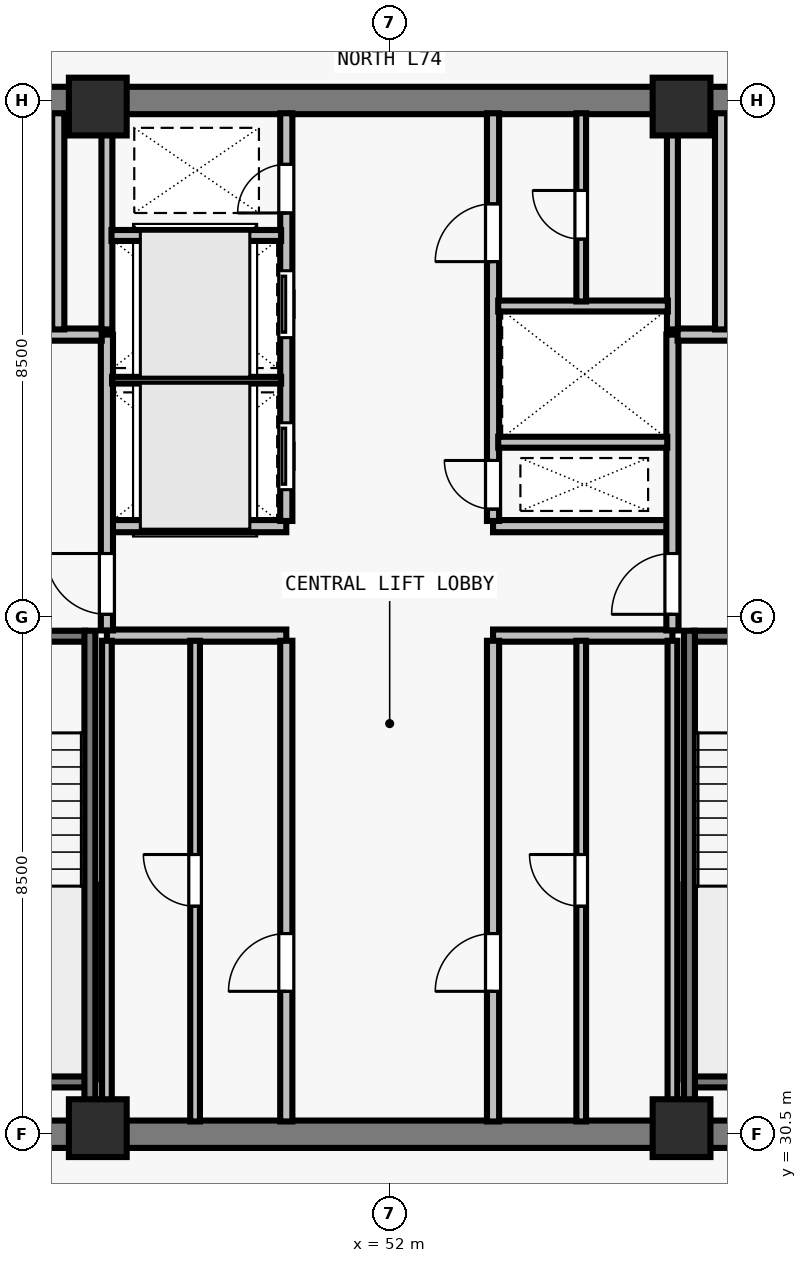
"""IFC4 building model, lengths in metres.
Left out: names, types, materials, properties, quantities, classifications, styles, units other than length and angle.
Written with IfcOpenShell. Run it as: python <this file> out.ifc"""

import sys

from ifc_helpers import new_model, si_unit, direction, frame, frame_2d, origin, origin_2d, place, context, subcontext, project, spatial, rectangle, extrude, element, fill, save


model = new_model("IFC4")
c1 = context("Model", 3, precision=1e-05, world=origin(), true_north=direction((0.0, 1.0)))
c2 = subcontext(c1, "Body", "Model", "MODEL_VIEW")
j1 = project(units=[si_unit("LENGTHUNIT", "METRE"), si_unit("PLANEANGLEUNIT", "RADIAN")], contexts=[c1])
p1 = place(None, origin())
s1 = spatial("IfcSite", under=j1, at=p1, CompositionType="ELEMENT")
p2 = place(p1, origin())
s2 = spatial("IfcBuilding", under=s1, at=p2, CompositionType="ELEMENT")
p3 = place(p2, frame((0.0, 0.0, 269.0)))
s3 = spatial("IfcBuildingStorey", under=s2, at=p3, CompositionType="ELEMENT", Elevation=269.0)
for number, where, z_axis, x_axis in (
    (1, (47.2, 30.6, 0.0), (0.0, 0.0, 1.0), (1.0, 0.0, 0.0)),
    (2, (56.8, 30.6, 0.0), (0.0, 0.0, 1.0), (1.0, 0.0, 0.0)),
    (3, (47.2, 47.4, 0.0), (0.0, 0.0, 1.0), (1.0, 0.0, 0.0)),
    (4, (56.8, 47.4, 0.0), (0.0, 0.0, 1.0), (1.0, 0.0, 0.0)),
):
    element("IfcColumn", number, at=place(p3, frame(where, z_axis=z_axis, x_axis=x_axis)), inside=s3, PredefinedType="COLUMN", context=c2, shape_type="SweptSolid", body=[
        extrude(rectangle(XDim=0.95, YDim=0.95, at=origin_2d()), origin(), (0.0, 0.0, 1.0), 3.5),
    ])
for number, where, z_axis, x_axis in (
    (5, (43.275, 30.5, 0.0), (0.0, 0.0, 1.0), (1.0, 0.0, 0.0)),
    (6, (43.275, 47.5, 0.0), (0.0, 0.0, 1.0), (1.0, 0.0, 0.0)),
):
    element("IfcWall", number, at=place(p3, frame(where, z_axis=z_axis, x_axis=x_axis)), inside=s3, PredefinedType="SHEAR", context=c2, shape_type="SweptSolid", body=[
        extrude(rectangle(XDim=17.45, YDim=0.45, at=frame_2d((8.725, 0.0))), origin(), (0.0, 0.0, 1.0), 3.29),
    ])
for number, where, z_axis, x_axis in (
    (7, (47.35, 38.7, 0.0), (0.0, 0.0, 1.0), (1.0, 0.0, 0.0)),
    (8, (47.35, 40.5, 0.0), (0.0, 0.0, 1.0), (1.0, 0.0, 0.0)),
    (9, (53.7, 38.7, 0.0), (0.0, 0.0, 1.0), (1.0, 0.0, 0.0)),
    (10, (53.7, 40.5, 0.0), (0.0, 0.0, 1.0), (1.0, 0.0, 0.0)),
):
    element("IfcWall", number, at=place(p3, frame(where, z_axis=z_axis, x_axis=x_axis)), inside=s3, PredefinedType="SOLIDWALL", context=c2, shape_type="SweptSolid", body=[
        extrude(rectangle(XDim=2.95, YDim=0.2, at=frame_2d((1.475, 0.0))), origin(), (0.0, 0.0, 1.0), 3.29),
    ])
p4 = place(p3, frame((50.3, 30.71, 0.0), z_axis=(0.0, 0.0, 1.0), x_axis=(0.0, 1.0, 0.0)))
e11 = element("IfcWall", 11, at=p4, inside=s3, PredefinedType="SOLIDWALL", context=c2, shape_type="SweptSolid", body=[
    extrude(rectangle(XDim=7.905, YDim=0.2, at=frame_2d((3.953, 0.0))), origin(), (0.0, 0.0, 1.0), 3.29),
])
p5 = place(p4, frame((2.14, 0.0, 0.0)))
e12 = element("IfcOpeningElement", 12, at=p5, cuts=e11, PredefinedType="OPENING", context=c2, shape_type="SweptSolid", body=[
    extrude(rectangle(XDim=0.95, YDim=2.12, at=frame_2d((0.475, 1.06))), frame((0.0, 0.11, 0.0), z_axis=(0.0, -1.0, 0.0), x_axis=(1.0, 0.0, 0.0)), (0.0, 0.0, 1.0), 0.22),
])
p6 = place(p3, frame((53.7, 30.71, 0.0), z_axis=(0.0, 0.0, 1.0), x_axis=(0.0, 1.0, 0.0)))
e13 = element("IfcWall", 13, at=p6, inside=s3, PredefinedType="SOLIDWALL", context=c2, shape_type="SweptSolid", body=[
    extrude(rectangle(XDim=7.905, YDim=0.2, at=frame_2d((3.953, 0.0))), origin(), (0.0, 0.0, 1.0), 3.29),
])
p7 = place(p6, frame((2.14, 0.0, 0.0)))
e14 = element("IfcOpeningElement", 14, at=p7, cuts=e13, PredefinedType="OPENING", context=c2, shape_type="SweptSolid", body=[
    extrude(rectangle(XDim=0.95, YDim=2.12, at=frame_2d((0.475, 1.06))), frame((0.0, 0.11, 0.0), z_axis=(0.0, -1.0, 0.0), x_axis=(1.0, 0.0, 0.0)), (0.0, 0.0, 1.0), 0.22),
])
p8 = place(p3, frame((50.3, 40.585, 0.0), z_axis=(0.0, 0.0, 1.0), x_axis=(0.0, 1.0, 0.0)))
e15 = element("IfcWall", 15, at=p8, inside=s3, PredefinedType="SOLIDWALL", context=c2, shape_type="SweptSolid", body=[
    extrude(rectangle(XDim=6.705, YDim=0.2, at=frame_2d((3.353, 0.0))), origin(), (0.0, 0.0, 1.0), 3.29),
])
p9 = place(p8, frame((0.515, 0.0, 0.0)))
e16 = element("IfcOpeningElement", 16, at=p9, cuts=e15, PredefinedType="OPENING", context=c2, shape_type="SweptSolid", body=[
    extrude(rectangle(XDim=1.1, YDim=2.2, at=frame_2d((0.55, 1.1))), frame((0.0, 0.11, 0.0), z_axis=(0.0, -1.0, 0.0), x_axis=(1.0, 0.0, 0.0)), (0.0, 0.0, 1.0), 0.22),
])
p10 = place(p8, frame((3.015, 0.0, 0.0)))
e17 = element("IfcOpeningElement", 17, at=p10, cuts=e15, PredefinedType="OPENING", context=c2, shape_type="SweptSolid", body=[
    extrude(rectangle(XDim=1.1, YDim=2.2, at=frame_2d((0.55, 1.1))), frame((0.0, 0.11, 0.0), z_axis=(0.0, -1.0, 0.0), x_axis=(1.0, 0.0, 0.0)), (0.0, 0.0, 1.0), 0.22),
])
p11 = place(p8, frame((5.065, 0.0, 0.0)))
e18 = element("IfcOpeningElement", 18, at=p11, cuts=e15, PredefinedType="OPENING", context=c2, shape_type="SweptSolid", body=[
    extrude(rectangle(XDim=0.8, YDim=2.08, at=frame_2d((0.4, 1.04))), frame((0.0, 0.11, 0.0), z_axis=(0.0, -1.0, 0.0), x_axis=(1.0, 0.0, 0.0)), (0.0, 0.0, 1.0), 0.22),
])
p12 = place(p3, frame((53.7, 40.585, 0.0), z_axis=(0.0, 0.0, 1.0), x_axis=(0.0, 1.0, 0.0)))
e19 = element("IfcWall", 19, at=p12, inside=s3, PredefinedType="SOLIDWALL", context=c2, shape_type="SweptSolid", body=[
    extrude(rectangle(XDim=6.705, YDim=0.2, at=frame_2d((3.353, 0.0))), origin(), (0.0, 0.0, 1.0), 3.29),
])
p13 = place(p12, frame((0.195, 0.0, 0.0)))
e20 = element("IfcOpeningElement", 20, at=p13, cuts=e19, PredefinedType="OPENING", context=c2, shape_type="SweptSolid", body=[
    extrude(rectangle(XDim=0.8, YDim=2.08, at=frame_2d((0.4, 1.04))), frame((0.0, 0.11, 0.0), z_axis=(0.0, -1.0, 0.0), x_axis=(1.0, 0.0, 0.0)), (0.0, 0.0, 1.0), 0.22),
])
p14 = place(p12, frame((4.265, 0.0, 0.0)))
e21 = element("IfcOpeningElement", 21, at=p14, cuts=e19, PredefinedType="OPENING", context=c2, shape_type="SweptSolid", body=[
    extrude(rectangle(XDim=0.95, YDim=2.12, at=frame_2d((0.475, 1.06))), frame((0.0, 0.11, 0.0), z_axis=(0.0, -1.0, 0.0), x_axis=(1.0, 0.0, 0.0)), (0.0, 0.0, 1.0), 0.22),
])
p15 = place(p3, frame((47.35, 38.785, 0.0), z_axis=(0.0, 0.0, 1.0), x_axis=(0.0, 1.0, 0.0)))
e22 = element("IfcWall", 22, at=p15, inside=s3, PredefinedType="SOLIDWALL", context=c2, shape_type="SweptSolid", body=[
    extrude(rectangle(XDim=4.865, YDim=0.2, at=frame_2d((2.433, 0.0))), origin(), (0.0, 0.0, 1.0), 3.29),
])
p16 = place(p15, frame((0.265, 0.0, 0.0)))
e23 = element("IfcOpeningElement", 23, at=p16, cuts=e22, PredefinedType="OPENING", context=c2, shape_type="SweptSolid", body=[
    extrude(rectangle(XDim=1.0, YDim=2.15, at=frame_2d((0.5, 1.075))), frame((0.0, 0.11, 0.0), z_axis=(0.0, -1.0, 0.0), x_axis=(1.0, 0.0, 0.0)), (0.0, 0.0, 1.0), 0.22),
])
p17 = place(p3, frame((43.71, 43.65, 0.0), z_axis=(0.0, 0.0, 1.0), x_axis=(1.0, 0.0, 0.0)))
e24 = element("IfcWall", 24, at=p17, inside=s3, PredefinedType="SOLIDWALL", context=c2, shape_type="SweptSolid", body=[
    extrude(rectangle(XDim=3.555, YDim=0.2, at=frame_2d((1.777, 0.0))), origin(), (0.0, 0.0, 1.0), 3.29),
])
p18 = place(p17, frame((1.16, 0.0, 0.0)))
e25 = element("IfcOpeningElement", 25, at=p18, cuts=e24, PredefinedType="OPENING", context=c2, shape_type="SweptSolid", body=[
    extrude(rectangle(XDim=1.1, YDim=2.2, at=frame_2d((0.55, 1.1))), frame((0.0, 0.11, 0.0), z_axis=(0.0, -1.0, 0.0), x_axis=(1.0, 0.0, 0.0)), (0.0, 0.0, 1.0), 0.22),
])
p19 = place(p3, frame((46.55, 43.735, 0.0), z_axis=(0.0, 0.0, 1.0), x_axis=(0.0, 1.0, 0.0)))
e26 = element("IfcWall", 26, at=p19, inside=s3, PredefinedType="SOLIDWALL", context=c2, shape_type="SweptSolid", body=[
    extrude(rectangle(XDim=3.555, YDim=0.2, at=frame_2d((1.777, 0.0))), origin(), (0.0, 0.0, 1.0), 3.29),
])
p20 = place(p3, frame((56.65, 38.785, 0.0), z_axis=(0.0, 0.0, 1.0), x_axis=(0.0, 1.0, 0.0)))
e27 = element("IfcWall", 27, at=p20, inside=s3, PredefinedType="SOLIDWALL", context=c2, shape_type="SweptSolid", body=[
    extrude(rectangle(XDim=4.865, YDim=0.2, at=frame_2d((2.433, 0.0))), origin(), (0.0, 0.0, 1.0), 3.29),
])
p21 = place(p20, frame((0.265, 0.0, 0.0)))
e28 = element("IfcOpeningElement", 28, at=p21, cuts=e27, PredefinedType="OPENING", context=c2, shape_type="SweptSolid", body=[
    extrude(rectangle(XDim=1.0, YDim=2.15, at=frame_2d((0.5, 1.075))), frame((0.0, 0.11, 0.0), z_axis=(0.0, -1.0, 0.0), x_axis=(1.0, 0.0, 0.0)), (0.0, 0.0, 1.0), 0.22),
])
p22 = place(p3, frame((56.735, 43.65, 0.0), z_axis=(0.0, 0.0, 1.0), x_axis=(1.0, 0.0, 0.0)))
e29 = element("IfcWall", 29, at=p22, inside=s3, PredefinedType="SOLIDWALL", context=c2, shape_type="SweptSolid", body=[
    extrude(rectangle(XDim=3.555, YDim=0.2, at=frame_2d((1.777, 0.0))), origin(), (0.0, 0.0, 1.0), 3.29),
])
p23 = place(p22, frame((1.295, 0.0, 0.0)))
e30 = element("IfcOpeningElement", 30, at=p23, cuts=e29, PredefinedType="OPENING", context=c2, shape_type="SweptSolid", body=[
    extrude(rectangle(XDim=1.1, YDim=2.2, at=frame_2d((0.55, 1.1))), frame((0.0, 0.11, 0.0), z_axis=(0.0, -1.0, 0.0), x_axis=(1.0, 0.0, 0.0)), (0.0, 0.0, 1.0), 0.22),
])
p24 = place(p3, frame((57.45, 43.735, 0.0), z_axis=(0.0, 0.0, 1.0), x_axis=(0.0, 1.0, 0.0)))
e31 = element("IfcWall", 31, at=p24, inside=s3, PredefinedType="SOLIDWALL", context=c2, shape_type="SweptSolid", body=[
    extrude(rectangle(XDim=3.555, YDim=0.2, at=frame_2d((1.777, 0.0))), origin(), (0.0, 0.0, 1.0), 3.29),
])
p25 = place(p3, frame((47.35, 30.71, 0.0), z_axis=(0.0, 0.0, 1.0), x_axis=(0.0, 1.0, 0.0)))
e32 = element("IfcWall", 32, at=p25, inside=s3, PredefinedType="PARTITIONING", context=c2, shape_type="SweptSolid", body=[
    extrude(rectangle(XDim=7.905, YDim=0.16, at=frame_2d((3.953, 0.0))), origin(), (0.0, 0.0, 1.0), 3.29),
])
p26 = place(p3, frame((48.8, 30.71, 0.0), z_axis=(0.0, 0.0, 1.0), x_axis=(0.0, 1.0, 0.0)))
e33 = element("IfcWall", 33, at=p26, inside=s3, PredefinedType="PARTITIONING", context=c2, shape_type="SweptSolid", body=[
    extrude(rectangle(XDim=7.905, YDim=0.16, at=frame_2d((3.953, 0.0))), origin(), (0.0, 0.0, 1.0), 3.29),
])
p27 = place(p26, frame((3.54, 0.0, 0.0)))
e34 = element("IfcOpeningElement", 34, at=p27, cuts=e33, PredefinedType="OPENING", context=c2, shape_type="SweptSolid", body=[
    extrude(rectangle(XDim=0.85, YDim=2.12, at=frame_2d((0.425, 1.06))), frame((0.0, 0.09, 0.0), z_axis=(0.0, -1.0, 0.0), x_axis=(1.0, 0.0, 0.0)), (0.0, 0.0, 1.0), 0.18),
])
p28 = place(p3, frame((56.65, 30.71, 0.0), z_axis=(0.0, 0.0, 1.0), x_axis=(0.0, 1.0, 0.0)))
e35 = element("IfcWall", 35, at=p28, inside=s3, PredefinedType="PARTITIONING", context=c2, shape_type="SweptSolid", body=[
    extrude(rectangle(XDim=7.905, YDim=0.16, at=frame_2d((3.953, 0.0))), origin(), (0.0, 0.0, 1.0), 3.29),
])
p29 = place(p3, frame((55.15, 30.71, 0.0), z_axis=(0.0, 0.0, 1.0), x_axis=(0.0, 1.0, 0.0)))
e36 = element("IfcWall", 36, at=p29, inside=s3, PredefinedType="PARTITIONING", context=c2, shape_type="SweptSolid", body=[
    extrude(rectangle(XDim=7.905, YDim=0.16, at=frame_2d((3.953, 0.0))), origin(), (0.0, 0.0, 1.0), 3.29),
])
p30 = place(p29, frame((3.54, 0.0, 0.0)))
e37 = element("IfcOpeningElement", 37, at=p30, cuts=e36, PredefinedType="OPENING", context=c2, shape_type="SweptSolid", body=[
    extrude(rectangle(XDim=0.85, YDim=2.12, at=frame_2d((0.425, 1.06))), frame((0.0, 0.09, 0.0), z_axis=(0.0, -1.0, 0.0), x_axis=(1.0, 0.0, 0.0)), (0.0, 0.0, 1.0), 0.18),
])
p31 = place(p3, frame((47.35, 43.735, 0.0), z_axis=(0.0, 0.0, 1.0), x_axis=(0.0, 1.0, 0.0)))
e38 = element("IfcWall", 38, at=p31, inside=s3, PredefinedType="SOLIDWALL", context=c2, shape_type="SweptSolid", body=[
    extrude(rectangle(XDim=3.555, YDim=0.18, at=frame_2d((1.777, 0.0))), origin(), (0.0, 0.0, 1.0), 3.29),
])
p32 = place(p3, frame((47.435, 42.9, 0.0), z_axis=(0.0, 0.0, 1.0), x_axis=(1.0, 0.0, 0.0)))
e39 = element("IfcWall", 39, at=p32, inside=s3, PredefinedType="PARTITIONING", context=c2, shape_type="SweptSolid", body=[
    extrude(rectangle(XDim=2.78, YDim=0.11, at=frame_2d((1.39, 0.0))), origin(), (0.0, 0.0, 1.0), 3.29),
])
p33 = place(p3, frame((47.425, 45.28, 0.0), z_axis=(0.0, 0.0, 1.0), x_axis=(1.0, 0.0, 0.0)))
e40 = element("IfcWall", 40, at=p33, inside=s3, PredefinedType="SOLIDWALL", context=c2, shape_type="SweptSolid", body=[
    extrude(rectangle(XDim=2.79, YDim=0.18, at=frame_2d((1.395, 0.0))), origin(), (0.0, 0.0, 1.0), 3.29),
])
p34 = place(p3, frame((56.65, 43.735, 0.0), z_axis=(0.0, 0.0, 1.0), x_axis=(0.0, 1.0, 0.0)))
e41 = element("IfcWall", 41, at=p34, inside=s3, PredefinedType="SOLIDWALL", context=c2, shape_type="SweptSolid", body=[
    extrude(rectangle(XDim=3.555, YDim=0.18, at=frame_2d((1.777, 0.0))), origin(), (0.0, 0.0, 1.0), 3.29),
])
p35 = place(p3, frame((53.785, 41.88, 0.0), z_axis=(0.0, 0.0, 1.0), x_axis=(1.0, 0.0, 0.0)))
e42 = element("IfcWall", 42, at=p35, inside=s3, PredefinedType="SOLIDWALL", context=c2, shape_type="SweptSolid", body=[
    extrude(rectangle(XDim=2.78, YDim=0.18, at=frame_2d((1.39, 0.0))), origin(), (0.0, 0.0, 1.0), 3.29),
])
p36 = place(p3, frame((53.785, 44.12, 0.0), z_axis=(0.0, 0.0, 1.0), x_axis=(1.0, 0.0, 0.0)))
e43 = element("IfcWall", 43, at=p36, inside=s3, PredefinedType="SOLIDWALL", context=c2, shape_type="SweptSolid", body=[
    extrude(rectangle(XDim=2.79, YDim=0.18, at=frame_2d((1.395, 0.0))), origin(), (0.0, 0.0, 1.0), 3.29),
])
p37 = place(p3, frame((55.15, 44.195, 0.0), z_axis=(0.0, 0.0, 1.0), x_axis=(0.0, 1.0, 0.0)))
e44 = element("IfcWall", 44, at=p37, inside=s3, PredefinedType="PARTITIONING", context=c2, shape_type="SweptSolid", body=[
    extrude(rectangle(XDim=3.095, YDim=0.16, at=frame_2d((1.547, 0.0))), origin(), (0.0, 0.0, 1.0), 3.29),
])
p38 = place(p37, frame((1.025, 0.0, 0.0)))
e45 = element("IfcOpeningElement", 45, at=p38, cuts=e44, PredefinedType="OPENING", context=c2, shape_type="SweptSolid", body=[
    extrude(rectangle(XDim=0.8, YDim=2.1, at=frame_2d((0.4, 1.05))), frame((0.0, 0.09, 0.0), z_axis=(0.0, -1.0, 0.0), x_axis=(1.0, 0.0, 0.0)), (0.0, 0.0, 1.0), 0.18),
])
p39 = place(p3, frame((43.715, 38.69, 0.0), z_axis=(0.0, 0.0, 1.0), x_axis=(1.0, 0.0, 0.0)))
e46 = element("IfcWall", 46, at=p39, inside=s3, PredefinedType="SOLIDWALL", context=c2, shape_type="SweptSolid", body=[
    extrude(rectangle(XDim=3.28, YDim=0.18, at=frame_2d((1.64, 0.0))), origin(), (0.0, 0.0, 1.0), 3.29),
])
p40 = place(p39, frame((1.165, 0.0, 0.0)))
e47 = element("IfcOpeningElement", 47, at=p40, cuts=e46, PredefinedType="OPENING", context=c2, shape_type="SweptSolid", body=[
    extrude(rectangle(XDim=0.95, YDim=2.15, at=frame_2d((0.475, 1.075))), frame((0.0, 0.1, 0.0), z_axis=(0.0, -1.0, 0.0), x_axis=(1.0, 0.0, 0.0)), (0.0, 0.0, 1.0), 0.2),
])
p41 = place(p3, frame((43.715, 31.36, 0.0), z_axis=(0.0, 0.0, 1.0), x_axis=(1.0, 0.0, 0.0)))
e48 = element("IfcWall", 48, at=p41, inside=s3, PredefinedType="SOLIDWALL", context=c2, shape_type="SweptSolid", body=[
    extrude(rectangle(XDim=3.28, YDim=0.18, at=frame_2d((1.64, 0.0))), origin(), (0.0, 0.0, 1.0), 3.29),
])
p42 = place(p3, frame((47.07, 38.78, 0.0), z_axis=(0.0, 0.0, 1.0), x_axis=(0.0, -1.0, 0.0)))
e49 = element("IfcWall", 49, at=p42, inside=s3, PredefinedType="SOLIDWALL", context=c2, shape_type="SweptSolid", body=[
    extrude(rectangle(XDim=8.067, YDim=0.18, at=frame_2d((4.034, 0.0))), origin(), (0.0, 0.0, 1.0), 3.29),
])
p43 = place(p3, frame((57.005, 38.69, 0.0), z_axis=(0.0, 0.0, 1.0), x_axis=(1.0, 0.0, 0.0)))
e50 = element("IfcWall", 50, at=p43, inside=s3, PredefinedType="SOLIDWALL", context=c2, shape_type="SweptSolid", body=[
    extrude(rectangle(XDim=3.28, YDim=0.18, at=frame_2d((1.64, 0.0))), origin(), (0.0, 0.0, 1.0), 3.29),
])
p44 = place(p43, frame((1.165, 0.0, 0.0)))
e51 = element("IfcOpeningElement", 51, at=p44, cuts=e50, PredefinedType="OPENING", context=c2, shape_type="SweptSolid", body=[
    extrude(rectangle(XDim=0.95, YDim=2.15, at=frame_2d((0.475, 1.075))), frame((0.0, 0.1, 0.0), z_axis=(0.0, -1.0, 0.0), x_axis=(1.0, 0.0, 0.0)), (0.0, 0.0, 1.0), 0.2),
])
p45 = place(p3, frame((57.005, 31.36, 0.0), z_axis=(0.0, 0.0, 1.0), x_axis=(1.0, 0.0, 0.0)))
e52 = element("IfcWall", 52, at=p45, inside=s3, PredefinedType="SOLIDWALL", context=c2, shape_type="SweptSolid", body=[
    extrude(rectangle(XDim=3.28, YDim=0.18, at=frame_2d((1.64, 0.0))), origin(), (0.0, 0.0, 1.0), 3.29),
])
p46 = place(p3, frame((56.93, 38.78, 0.0), z_axis=(0.0, 0.0, 1.0), x_axis=(0.0, -1.0, 0.0)))
e53 = element("IfcWall", 53, at=p46, inside=s3, PredefinedType="SOLIDWALL", context=c2, shape_type="SweptSolid", body=[
    extrude(rectangle(XDim=8.067, YDim=0.18, at=frame_2d((4.034, 0.0))), origin(), (0.0, 0.0, 1.0), 3.29),
])
p47 = place(p16, origin())
e54 = element("IfcDoor", 54, at=p47, inside=s3, OperationType="SINGLE_SWING_RIGHT", PredefinedType="DOOR", context=c2, shape_type="SweptSolid", body=[
    extrude(rectangle(XDim=1.0, YDim=2.15, at=frame_2d((0.5, 1.075))), frame((0.0, 0.025, 0.0), z_axis=(0.0, -1.0, 0.0), x_axis=(1.0, 0.0, 0.0)), (0.0, 0.0, 1.0), 0.05),
])
fill(e23, e54)
p48 = place(p21, origin())
e55 = element("IfcDoor", 55, at=p48, inside=s3, OperationType="SINGLE_SWING_LEFT", PredefinedType="DOOR", context=c2, shape_type="SweptSolid", body=[
    extrude(rectangle(XDim=1.0, YDim=2.15, at=frame_2d((0.5, 1.075))), frame((0.0, 0.025, 0.0), z_axis=(0.0, -1.0, 0.0), x_axis=(1.0, 0.0, 0.0)), (0.0, 0.0, 1.0), 0.05),
])
fill(e28, e55)
p49 = place(p5, origin())
e56 = element("IfcDoor", 56, at=p49, inside=s3, OperationType="SINGLE_SWING_LEFT", PredefinedType="DOOR", context=c2, shape_type="SweptSolid", body=[
    extrude(rectangle(XDim=0.95, YDim=2.12, at=frame_2d((0.475, 1.06))), frame((0.0, 0.025, 0.0), z_axis=(0.0, -1.0, 0.0), x_axis=(1.0, 0.0, 0.0)), (0.0, 0.0, 1.0), 0.05),
])
fill(e12, e56)
p50 = place(p27, origin())
e57 = element("IfcDoor", 57, at=p50, inside=s3, OperationType="SINGLE_SWING_RIGHT", PredefinedType="DOOR", context=c2, shape_type="SweptSolid", body=[
    extrude(rectangle(XDim=0.85, YDim=2.12, at=frame_2d((0.425, 1.06))), frame((0.0, 0.025, 0.0), z_axis=(0.0, -1.0, 0.0), x_axis=(1.0, 0.0, 0.0)), (0.0, 0.0, 1.0), 0.05),
])
fill(e34, e57)
p51 = place(p7, origin())
e58 = element("IfcDoor", 58, at=p51, inside=s3, OperationType="SINGLE_SWING_LEFT", PredefinedType="DOOR", context=c2, shape_type="SweptSolid", body=[
    extrude(rectangle(XDim=0.95, YDim=2.12, at=frame_2d((0.475, 1.06))), frame((0.0, 0.025, 0.0), z_axis=(0.0, -1.0, 0.0), x_axis=(1.0, 0.0, 0.0)), (0.0, 0.0, 1.0), 0.05),
])
fill(e14, e58)
p52 = place(p30, origin())
e59 = element("IfcDoor", 59, at=p52, inside=s3, OperationType="SINGLE_SWING_RIGHT", PredefinedType="DOOR", context=c2, shape_type="SweptSolid", body=[
    extrude(rectangle(XDim=0.85, YDim=2.12, at=frame_2d((0.425, 1.06))), frame((0.0, 0.025, 0.0), z_axis=(0.0, -1.0, 0.0), x_axis=(1.0, 0.0, 0.0)), (0.0, 0.0, 1.0), 0.05),
])
fill(e37, e59)
p53 = place(p9, origin())
e60 = element("IfcDoor", 60, at=p53, inside=s3, OperationType="SLIDING_TO_LEFT", PredefinedType="DOOR", context=c2, shape_type="SweptSolid", body=[
    extrude(rectangle(XDim=1.1, YDim=2.2, at=frame_2d((0.55, 1.1))), frame((0.0, 0.025, 0.0), z_axis=(0.0, -1.0, 0.0), x_axis=(1.0, 0.0, 0.0)), (0.0, 0.0, 1.0), 0.05),
])
fill(e16, e60)
p54 = place(p10, origin())
e61 = element("IfcDoor", 61, at=p54, inside=s3, OperationType="SLIDING_TO_LEFT", PredefinedType="DOOR", context=c2, shape_type="SweptSolid", body=[
    extrude(rectangle(XDim=1.1, YDim=2.2, at=frame_2d((0.55, 1.1))), frame((0.0, 0.025, 0.0), z_axis=(0.0, -1.0, 0.0), x_axis=(1.0, 0.0, 0.0)), (0.0, 0.0, 1.0), 0.05),
])
fill(e17, e61)
p55 = place(p11, origin())
e62 = element("IfcDoor", 62, at=p55, inside=s3, OperationType="SINGLE_SWING_LEFT", PredefinedType="DOOR", context=c2, shape_type="SweptSolid", body=[
    extrude(rectangle(XDim=0.8, YDim=2.08, at=frame_2d((0.4, 1.04))), frame((0.0, 0.025, 0.0), z_axis=(0.0, -1.0, 0.0), x_axis=(1.0, 0.0, 0.0)), (0.0, 0.0, 1.0), 0.05),
])
fill(e18, e62)
p56 = place(p13, origin())
e63 = element("IfcDoor", 63, at=p56, inside=s3, OperationType="SINGLE_SWING_RIGHT", PredefinedType="DOOR", context=c2, shape_type="SweptSolid", body=[
    extrude(rectangle(XDim=0.8, YDim=2.08, at=frame_2d((0.4, 1.04))), frame((0.0, 0.025, 0.0), z_axis=(0.0, -1.0, 0.0), x_axis=(1.0, 0.0, 0.0)), (0.0, 0.0, 1.0), 0.05),
])
fill(e20, e63)
p57 = place(p14, origin())
e64 = element("IfcDoor", 64, at=p57, inside=s3, OperationType="SINGLE_SWING_LEFT", PredefinedType="DOOR", context=c2, shape_type="SweptSolid", body=[
    extrude(rectangle(XDim=0.95, YDim=2.12, at=frame_2d((0.475, 1.06))), frame((0.0, 0.025, 0.0), z_axis=(0.0, -1.0, 0.0), x_axis=(1.0, 0.0, 0.0)), (0.0, 0.0, 1.0), 0.05),
])
fill(e21, e64)
p58 = place(p38, origin())
e65 = element("IfcDoor", 65, at=p58, inside=s3, OperationType="SINGLE_SWING_RIGHT", PredefinedType="DOOR", context=c2, shape_type="SweptSolid", body=[
    extrude(rectangle(XDim=0.8, YDim=2.1, at=frame_2d((0.4, 1.05))), frame((0.0, 0.025, 0.0), z_axis=(0.0, -1.0, 0.0), x_axis=(1.0, 0.0, 0.0)), (0.0, 0.0, 1.0), 0.05),
])
fill(e45, e65)
save(model, sys.argv[1])
